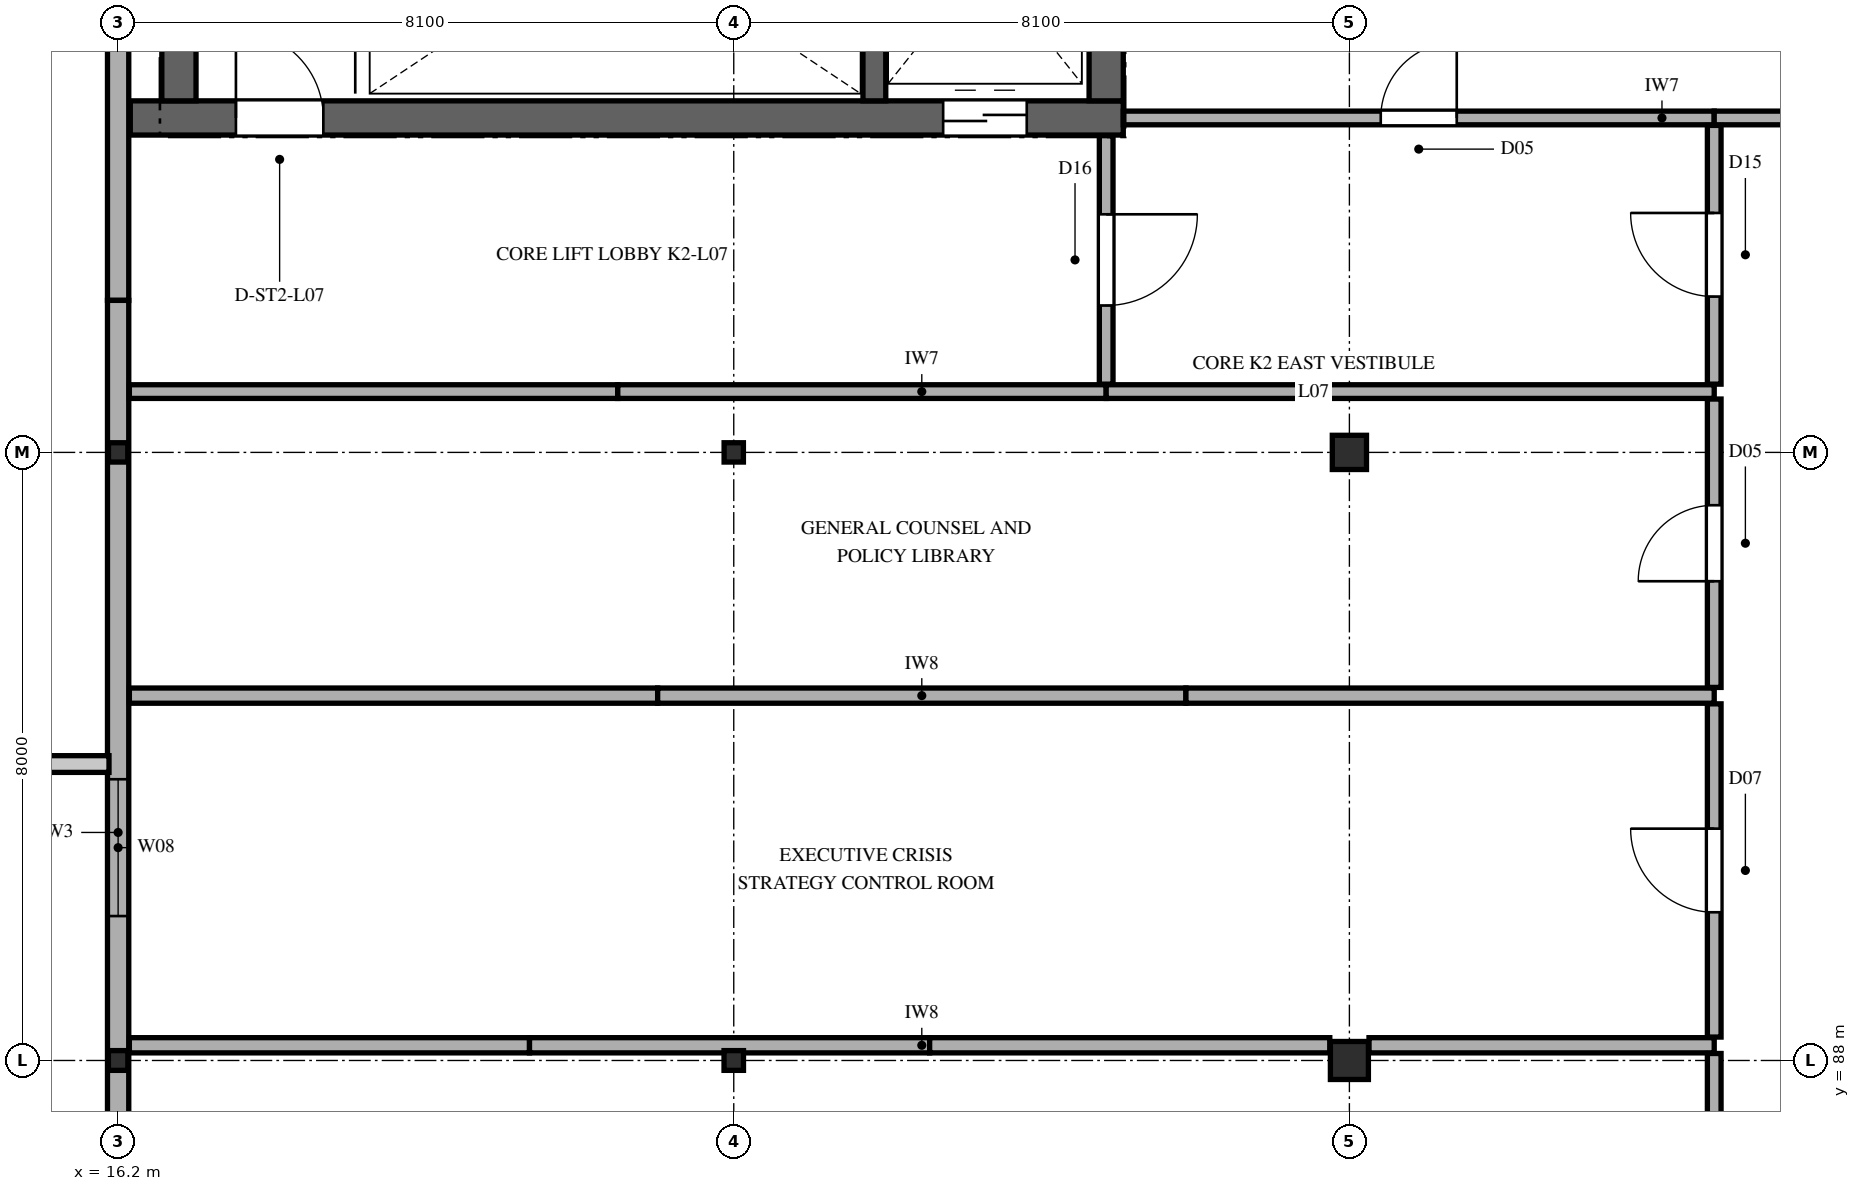
"""IFC4 building model, lengths in metres.
Left out: names, types, materials, properties, quantities, classifications, styles, units other than length and angle.
Written with IfcOpenShell. Run it as: python <this file> out.ifc"""

import sys

from ifc_helpers import new_model, si_unit, direction, frame, frame_2d, origin, origin_2d, place, context, subcontext, project, spatial, rectangle, hollow_rectangle, i_section, extrude, element, fill, save


model = new_model("IFC4")
c1 = context("Model", 3, precision=1e-05, world=origin(), true_north=direction((0.0, 1.0)))
c2 = subcontext(c1, "Body", "Model", "MODEL_VIEW")
j1 = project(units=[si_unit("LENGTHUNIT", "METRE"), si_unit("PLANEANGLEUNIT", "RADIAN")], contexts=[c1])
p1 = place(None, origin())
s1 = spatial("IfcSite", under=j1, at=p1, CompositionType="ELEMENT")
p2 = place(p1, origin())
s2 = spatial("IfcBuilding", under=s1, at=p2, CompositionType="ELEMENT")
p3 = place(p2, frame((0.0, 0.0, 33.3)))
s3 = spatial("IfcBuildingStorey", under=s2, at=p3, CompositionType="ELEMENT", Elevation=33.3)
p4 = place(p3, frame((16.36, 100.4, 0.0), z_axis=(0.0, 0.0, 1.0), x_axis=(1.0, 0.0, 0.0)))
e1 = element("IfcWall", 1, at=p4, inside=s3, PredefinedType="SHEAR", context=c2, shape_type="SweptSolid", body=[
    extrude(rectangle(XDim=13.065, YDim=0.45, at=frame_2d((6.532, 0.0))), origin(), (0.0, 0.0, 1.0), 3.98),
])
p5 = place(p4, frame((1.39, 0.0, 0.0)))
e2 = element("IfcOpeningElement", 2, at=p5, cuts=e1, PredefinedType="OPENING", context=c2, shape_type="SweptSolid", body=[
    extrude(rectangle(XDim=1.15, YDim=2.25, at=frame_2d((0.575, 1.125))), frame((0.0, 0.235, 0.0), z_axis=(0.0, -1.0, 0.0), x_axis=(1.0, 0.0, 0.0)), (0.0, 0.0, 1.0), 0.47),
])
p6 = place(p4, frame((10.695, 0.0, 0.0)))
e3 = element("IfcOpeningElement", 3, at=p6, cuts=e1, PredefinedType="OPENING", context=c2, shape_type="SweptSolid", body=[
    extrude(rectangle(XDim=1.1, YDim=2.2, at=frame_2d((0.55, 1.1))), frame((0.0, 0.235, 0.0), z_axis=(0.0, -1.0, 0.0), x_axis=(1.0, 0.0, 0.0)), (0.0, 0.0, 1.0), 0.47),
])
for number, where, z_axis, x_axis in (
    (4, (17.0, 100.625, 0.0), (0.0, 0.0, 1.0), (0.0, 1.0, 0.0)),
    (5, (29.2, 100.625, 0.0), (0.0, 0.0, 1.0), (0.0, 1.0, 0.0)),
):
    element("IfcWall", number, at=place(p3, frame(where, z_axis=z_axis, x_axis=x_axis)), inside=s3, PredefinedType="SHEAR", context=c2, shape_type="SweptSolid", body=[
        extrude(rectangle(XDim=7.95, YDim=0.45, at=frame_2d((3.975, 0.0))), origin(), (0.0, 0.0, 1.0), 3.98),
    ])
p7 = place(p3, frame((26.15, 100.625, 0.0), z_axis=(0.0, 0.0, 1.0), x_axis=(0.0, 1.0, 0.0)))
e6 = element("IfcWall", 6, at=p7, inside=s3, PredefinedType="SHEAR", context=c2, shape_type="SweptSolid", body=[
    extrude(rectangle(XDim=7.95, YDim=0.3, at=frame_2d((3.975, 0.0))), origin(), (0.0, 0.0, 1.0), 3.98),
])
p8 = place(p3, frame((16.2, 88.0, 0.0), z_axis=(0.0, 0.0, 1.0), x_axis=(1.0, 0.0, 0.0)))
e7 = element("IfcColumn", 7, at=p8, inside=s3, PredefinedType="COLUMN", context=c2, shape_type="SweptSolid", body=[
    extrude(i_section(OverallWidth=0.256, OverallDepth=0.26, WebThickness=0.011, FlangeThickness=0.017, FilletRadius=0.013, at=origin_2d()), origin(), (0.0, 0.0, 1.0), 3.98),
])
p9 = place(p3, frame((16.2, 96.0, 0.0), z_axis=(0.0, 0.0, 1.0), x_axis=(1.0, 0.0, 0.0)))
e8 = element("IfcColumn", 8, at=p9, inside=s3, PredefinedType="COLUMN", context=c2, shape_type="SweptSolid", body=[
    extrude(hollow_rectangle(XDim=0.254, YDim=0.254, WallThickness=0.013, InnerFilletRadius=0.013, OuterFilletRadius=0.025, at=origin_2d()), origin(), (0.0, 0.0, 1.0), 3.98),
])
p10 = place(p3, frame((24.3, 88.0, 0.0), z_axis=(0.0, 0.0, 1.0), x_axis=(1.0, 0.0, 0.0)))
e9 = element("IfcColumn", 9, at=p10, inside=s3, PredefinedType="COLUMN", context=c2, shape_type="SweptSolid", body=[
    extrude(i_section(OverallWidth=0.256, OverallDepth=0.26, WebThickness=0.011, FlangeThickness=0.017, FilletRadius=0.013, at=origin_2d()), origin(), (0.0, 0.0, 1.0), 3.98),
])
p11 = place(p3, frame((24.3, 96.0, 0.0), z_axis=(0.0, 0.0, 1.0), x_axis=(1.0, 0.0, 0.0)))
e10 = element("IfcColumn", 10, at=p11, inside=s3, PredefinedType="COLUMN", context=c2, shape_type="SweptSolid", body=[
    extrude(hollow_rectangle(XDim=0.254, YDim=0.254, WallThickness=0.013, InnerFilletRadius=0.013, OuterFilletRadius=0.025, at=origin_2d()), origin(), (0.0, 0.0, 1.0), 3.98),
])
p12 = place(p3, frame((32.4, 88.0, 0.0), z_axis=(0.0, 0.0, 1.0), x_axis=(1.0, 0.0, 0.0)))
e11 = element("IfcColumn", 11, at=p12, inside=s3, PredefinedType="COLUMN", context=c2, shape_type="SweptSolid", body=[
    extrude(rectangle(XDim=0.5, YDim=0.5, at=origin_2d()), origin(), (0.0, 0.0, 1.0), 3.98),
])
p13 = place(p3, frame((32.4, 96.0, 0.0), z_axis=(0.0, 0.0, 1.0), x_axis=(1.0, 0.0, 0.0)))
e12 = element("IfcColumn", 12, at=p13, inside=s3, PredefinedType="COLUMN", context=c2, shape_type="SweptSolid", body=[
    extrude(rectangle(XDim=0.45, YDim=0.45, at=origin_2d()), origin(), (0.0, 0.0, 1.0), 3.98),
])
p14 = place(p3, frame((16.2, 112.0, 0.0), z_axis=(0.0, 0.0, 1.0), x_axis=(0.0, -1.0, 0.0)))
e13 = element("IfcWall", 13, at=p14, inside=s3, PredefinedType="SOLIDWALL", context=c2, shape_type="SweptSolid", body=[
    extrude(rectangle(XDim=14.0, YDim=0.28, at=frame_2d((7.0, 0.0))), origin(), (0.0, 0.0, 1.0), 3.655),
])
p15 = place(p3, frame((16.2, 98.0, 0.0), z_axis=(0.0, 0.0, 1.0), x_axis=(0.0, -1.0, 0.0)))
e14 = element("IfcWall", 14, at=p15, inside=s3, PredefinedType="SOLIDWALL", context=c2, shape_type="SweptSolid", body=[
    extrude(rectangle(XDim=14.0, YDim=0.28, at=frame_2d((7.0, 0.0))), origin(), (0.0, 0.0, 1.0), 3.655),
])
p16 = place(p15, frame((6.3, 0.0, 0.95)))
e15 = element("IfcOpeningElement", 15, at=p16, cuts=e14, PredefinedType="OPENING", context=c2, shape_type="SweptSolid", body=[
    extrude(rectangle(XDim=1.8, YDim=1.5, at=frame_2d((0.9, 0.75))), frame((0.0, 0.15, 0.0), z_axis=(0.0, -1.0, 0.0), x_axis=(1.0, 0.0, 0.0)), (0.0, 0.0, 1.0), 0.3),
])
p17 = place(p3, frame((16.348, 88.2, 0.0), z_axis=(0.0, 0.0, 1.0), x_axis=(1.0, 0.0, 0.0)))
e16 = element("IfcWall", 16, at=p17, inside=s3, PredefinedType="PARTITIONING", context=c2, shape_type="SweptSolid", body=[
    extrude(rectangle(XDim=5.265, YDim=0.2, at=frame_2d((2.632, 0.0))), origin(), (0.0, 0.0, 1.0), 3.655),
])
p18 = place(p3, frame((21.613, 88.2, 0.0), z_axis=(0.0, 0.0, 1.0), x_axis=(1.0, 0.0, 0.0)))
e17 = element("IfcWall", 17, at=p18, inside=s3, PredefinedType="PARTITIONING", context=c2, shape_type="SweptSolid", body=[
    extrude(rectangle(XDim=5.265, YDim=0.2, at=frame_2d((2.632, 0.0))), origin(), (0.0, 0.0, 1.0), 3.655),
])
p19 = place(p3, frame((26.877, 88.2, 0.0), z_axis=(0.0, 0.0, 1.0), x_axis=(1.0, 0.0, 0.0)))
e18 = element("IfcWall", 18, at=p19, inside=s3, PredefinedType="PARTITIONING", context=c2, shape_type="SweptSolid", body=[
    extrude(rectangle(XDim=5.265, YDim=0.2, at=frame_2d((2.632, 0.0))), origin(), (0.0, 0.0, 1.0), 3.655),
])
p20 = place(p3, frame((32.658, 88.2, 0.0), z_axis=(0.0, 0.0, 1.0), x_axis=(1.0, 0.0, 0.0)))
e19 = element("IfcWall", 19, at=p20, inside=s3, PredefinedType="PARTITIONING", context=c2, shape_type="SweptSolid", body=[
    extrude(rectangle(XDim=4.542, YDim=0.2, at=frame_2d((2.271, 0.0))), origin(), (0.0, 0.0, 1.0), 3.655),
])
for number, where, z_axis, x_axis in (
    (20, (16.348, 92.8, 0.0), (0.0, 0.0, 1.0), (1.0, 0.0, 0.0)),
    (21, (23.299, 92.8, 0.0), (0.0, 0.0, 1.0), (1.0, 0.0, 0.0)),
    (22, (30.249, 92.8, 0.0), (0.0, 0.0, 1.0), (1.0, 0.0, 0.0)),
):
    element("IfcWall", number, at=place(p3, frame(where, z_axis=z_axis, x_axis=x_axis)), inside=s3, PredefinedType="PARTITIONING", context=c2, shape_type="SweptSolid", body=[
        extrude(rectangle(XDim=6.951, YDim=0.2, at=frame_2d((3.475, 0.0))), origin(), (0.0, 0.0, 1.0), 3.98),
    ])
for number, where, z_axis, x_axis in (
    (23, (16.348, 96.8, 0.0), (0.0, 0.0, 1.0), (1.0, 0.0, 0.0)),
    (24, (22.774, 96.8, 0.0), (0.0, 0.0, 1.0), (1.0, 0.0, 0.0)),
):
    element("IfcWall", number, at=place(p3, frame(where, z_axis=z_axis, x_axis=x_axis)), inside=s3, PredefinedType="PARTITIONING", context=c2, shape_type="SweptSolid", body=[
        extrude(rectangle(XDim=6.426, YDim=0.18, at=frame_2d((3.213, 0.0))), origin(), (0.0, 0.0, 1.0), 3.98),
    ])
p21 = place(p3, frame((29.2, 96.8, 0.0), z_axis=(0.0, 0.0, 1.0), x_axis=(1.0, 0.0, 0.0)))
e25 = element("IfcWall", 25, at=p21, inside=s3, PredefinedType="PARTITIONING", context=c2, shape_type="SweptSolid", body=[
    extrude(rectangle(XDim=8.0, YDim=0.18, at=frame_2d((4.0, 0.0))), origin(), (0.0, 0.0, 1.0), 3.98),
])
p22 = place(p3, frame((29.425, 100.4, 0.0), z_axis=(0.0, 0.0, 1.0), x_axis=(1.0, 0.0, 0.0)))
e26 = element("IfcWall", 26, at=p22, inside=s3, PredefinedType="PARTITIONING", context=c2, shape_type="SweptSolid", body=[
    extrude(rectangle(XDim=7.775, YDim=0.18, at=frame_2d((3.887, 0.0))), origin(), (0.0, 0.0, 1.0), 3.98),
])
p23 = place(p22, frame((3.387, 0.0, 0.0)))
e27 = element("IfcOpeningElement", 27, at=p23, cuts=e26, PredefinedType="OPENING", context=c2, shape_type="SweptSolid", body=[
    extrude(rectangle(XDim=1.0, YDim=2.2, at=frame_2d((0.5, 1.1))), frame((0.0, 0.1, 0.0), z_axis=(0.0, -1.0, 0.0), x_axis=(1.0, 0.0, 0.0)), (0.0, 0.0, 1.0), 0.2),
])
p24 = place(p3, frame((37.2, 100.4, 0.0), z_axis=(0.0, 0.0, 1.0), x_axis=(1.0, 0.0, 0.0)))
e28 = element("IfcWall", 28, at=p24, inside=s3, PredefinedType="PARTITIONING", context=c2, shape_type="SweptSolid", body=[
    extrude(rectangle(XDim=2.4, YDim=0.18, at=frame_2d((1.2, 0.0))), origin(), (0.0, 0.0, 1.0), 3.98),
])
p25 = place(p3, frame((29.2, 96.898, 0.0), z_axis=(0.0, 0.0, 1.0), x_axis=(0.0, 1.0, 0.0)))
e29 = element("IfcWall", 29, at=p25, inside=s3, PredefinedType="PARTITIONING", context=c2, shape_type="SweptSolid", body=[
    extrude(rectangle(XDim=3.269, YDim=0.18, at=frame_2d((1.635, 0.0))), origin(), (0.0, 0.0, 1.0), 3.98),
])
p26 = place(p25, frame((1.034, 0.0, 0.0)))
e30 = element("IfcOpeningElement", 30, at=p26, cuts=e29, PredefinedType="OPENING", context=c2, shape_type="SweptSolid", body=[
    extrude(rectangle(XDim=1.2, YDim=2.2, at=frame_2d((0.6, 1.1))), frame((0.0, 0.1, 0.0), z_axis=(0.0, -1.0, 0.0), x_axis=(1.0, 0.0, 0.0)), (0.0, 0.0, 1.0), 0.2),
])
p27 = place(p3, frame((37.2, 82.063, 0.0), z_axis=(0.0, 0.0, 1.0), x_axis=(0.0, 1.0, 0.0)))
e31 = element("IfcWall", 31, at=p27, inside=s3, PredefinedType="PARTITIONING", context=c2, shape_type="SweptSolid", body=[
    extrude(rectangle(XDim=6.029, YDim=0.18, at=frame_2d((3.015, 0.0))), origin(), (0.0, 0.0, 1.0), 3.98),
])
p28 = place(p27, frame((2.514, 0.0, 0.0)))
e32 = element("IfcOpeningElement", 32, at=p28, cuts=e31, PredefinedType="OPENING", context=c2, shape_type="SweptSolid", body=[
    extrude(rectangle(XDim=1.0, YDim=2.2, at=frame_2d((0.5, 1.1))), frame((0.0, 0.1, 0.0), z_axis=(0.0, -1.0, 0.0), x_axis=(1.0, 0.0, 0.0)), (0.0, 0.0, 1.0), 0.2),
])
p29 = place(p3, frame((37.2, 88.308, 0.0), z_axis=(0.0, 0.0, 1.0), x_axis=(0.0, 1.0, 0.0)))
e33 = element("IfcWall", 33, at=p29, inside=s3, PredefinedType="PARTITIONING", context=c2, shape_type="SweptSolid", body=[
    extrude(rectangle(XDim=4.384, YDim=0.18, at=frame_2d((2.192, 0.0))), origin(), (0.0, 0.0, 1.0), 3.98),
])
p30 = place(p29, frame((1.642, 0.0, 0.0)))
e34 = element("IfcOpeningElement", 34, at=p30, cuts=e33, PredefinedType="OPENING", context=c2, shape_type="SweptSolid", body=[
    extrude(rectangle(XDim=1.1, YDim=2.2, at=frame_2d((0.55, 1.1))), frame((0.0, 0.1, 0.0), z_axis=(0.0, -1.0, 0.0), x_axis=(1.0, 0.0, 0.0)), (0.0, 0.0, 1.0), 0.2),
])
p31 = place(p3, frame((37.2, 92.908, 0.0), z_axis=(0.0, 0.0, 1.0), x_axis=(0.0, 1.0, 0.0)))
e35 = element("IfcWall", 35, at=p31, inside=s3, PredefinedType="PARTITIONING", context=c2, shape_type="SweptSolid", body=[
    extrude(rectangle(XDim=3.794, YDim=0.18, at=frame_2d((1.897, 0.0))), origin(), (0.0, 0.0, 1.0), 3.98),
])
p32 = place(p31, frame((1.397, 0.0, 0.0)))
e36 = element("IfcOpeningElement", 36, at=p32, cuts=e35, PredefinedType="OPENING", context=c2, shape_type="SweptSolid", body=[
    extrude(rectangle(XDim=1.0, YDim=2.2, at=frame_2d((0.5, 1.1))), frame((0.0, 0.1, 0.0), z_axis=(0.0, -1.0, 0.0), x_axis=(1.0, 0.0, 0.0)), (0.0, 0.0, 1.0), 0.2),
])
p33 = place(p3, frame((37.2, 96.898, 0.0), z_axis=(0.0, 0.0, 1.0), x_axis=(0.0, 1.0, 0.0)))
e37 = element("IfcWall", 37, at=p33, inside=s3, PredefinedType="PARTITIONING", context=c2, shape_type="SweptSolid", body=[
    extrude(rectangle(XDim=3.404, YDim=0.18, at=frame_2d((1.702, 0.0))), origin(), (0.0, 0.0, 1.0), 3.98),
])
p34 = place(p33, frame((1.152, 0.0, 0.0)))
e38 = element("IfcOpeningElement", 38, at=p34, cuts=e37, PredefinedType="OPENING", context=c2, shape_type="SweptSolid", body=[
    extrude(rectangle(XDim=1.1, YDim=2.2, at=frame_2d((0.55, 1.1))), frame((0.0, 0.1, 0.0), z_axis=(0.0, -1.0, 0.0), x_axis=(1.0, 0.0, 0.0)), (0.0, 0.0, 1.0), 0.2),
])
p35 = place(p16, origin())
e39 = element("IfcWindow", 39, at=p35, inside=s3, PartitioningType="DOUBLE_PANEL_VERTICAL", PredefinedType="WINDOW", context=c2, shape_type="SweptSolid", body=[
    extrude(rectangle(XDim=1.8, YDim=1.5, at=frame_2d((0.9, 0.75))), frame((0.0, 0.03, 0.0), z_axis=(0.0, -1.0, 0.0), x_axis=(1.0, 0.0, 0.0)), (0.0, 0.0, 1.0), 0.06),
])
fill(e15, e39)
p36 = place(p5, origin())
e40 = element("IfcDoor", 40, at=p36, inside=s3, OperationType="SINGLE_SWING_LEFT", PredefinedType="DOOR", context=c2, shape_type="SweptSolid", body=[
    extrude(rectangle(XDim=1.15, YDim=2.25, at=frame_2d((0.575, 1.125))), frame((0.0, 0.025, 0.0), z_axis=(0.0, -1.0, 0.0), x_axis=(1.0, 0.0, 0.0)), (0.0, 0.0, 1.0), 0.05),
])
fill(e2, e40)
p37 = place(p6, frame((1.1, 0.0, 0.0), z_axis=(0.0, 0.0, 1.0), x_axis=(-1.0, 0.0, 0.0)))
e41 = element("IfcDoor", 41, at=p37, inside=s3, OperationType="DOUBLE_DOOR_SLIDING", PredefinedType="DOOR", context=c2, shape_type="SweptSolid", body=[
    extrude(rectangle(XDim=1.1, YDim=2.2, at=frame_2d((0.55, 1.1))), frame((0.0, 0.025, 0.0), z_axis=(0.0, -1.0, 0.0), x_axis=(1.0, 0.0, 0.0)), (0.0, 0.0, 1.0), 0.05),
])
fill(e3, e41)
p38 = place(p23, origin())
e42 = element("IfcDoor", 42, at=p38, inside=s3, OperationType="SINGLE_SWING_RIGHT", PredefinedType="DOOR", context=c2, shape_type="SweptSolid", body=[
    extrude(rectangle(XDim=1.0, YDim=2.2, at=frame_2d((0.5, 1.1))), frame((0.0, 0.025, 0.0), z_axis=(0.0, -1.0, 0.0), x_axis=(1.0, 0.0, 0.0)), (0.0, 0.0, 1.0), 0.05),
])
fill(e27, e42)
p39 = place(p26, frame((1.2, 0.0, 0.0), z_axis=(0.0, 0.0, 1.0), x_axis=(-1.0, 0.0, 0.0)))
e43 = element("IfcDoor", 43, at=p39, inside=s3, OperationType="SINGLE_SWING_RIGHT", PredefinedType="DOOR", context=c2, shape_type="SweptSolid", body=[
    extrude(rectangle(XDim=1.2, YDim=2.2, at=frame_2d((0.6, 1.1))), frame((0.0, 0.025, 0.0), z_axis=(0.0, -1.0, 0.0), x_axis=(1.0, 0.0, 0.0)), (0.0, 0.0, 1.0), 0.05),
])
fill(e30, e43)
p40 = place(p30, origin())
e44 = element("IfcDoor", 44, at=p40, inside=s3, OperationType="SINGLE_SWING_RIGHT", PredefinedType="DOOR", context=c2, shape_type="SweptSolid", body=[
    extrude(rectangle(XDim=1.1, YDim=2.2, at=frame_2d((0.55, 1.1))), frame((0.0, 0.025, 0.0), z_axis=(0.0, -1.0, 0.0), x_axis=(1.0, 0.0, 0.0)), (0.0, 0.0, 1.0), 0.05),
])
fill(e34, e44)
p41 = place(p32, origin())
e45 = element("IfcDoor", 45, at=p41, inside=s3, OperationType="SINGLE_SWING_LEFT", PredefinedType="DOOR", context=c2, shape_type="SweptSolid", body=[
    extrude(rectangle(XDim=1.0, YDim=2.2, at=frame_2d((0.5, 1.1))), frame((0.0, 0.025, 0.0), z_axis=(0.0, -1.0, 0.0), x_axis=(1.0, 0.0, 0.0)), (0.0, 0.0, 1.0), 0.05),
])
fill(e36, e45)
p42 = place(p34, origin())
e46 = element("IfcDoor", 46, at=p42, inside=s3, OperationType="SINGLE_SWING_RIGHT", PredefinedType="DOOR", context=c2, shape_type="SweptSolid", body=[
    extrude(rectangle(XDim=1.1, YDim=2.2, at=frame_2d((0.55, 1.1))), frame((0.0, 0.025, 0.0), z_axis=(0.0, -1.0, 0.0), x_axis=(1.0, 0.0, 0.0)), (0.0, 0.0, 1.0), 0.05),
])
fill(e38, e46)
save(model, sys.argv[1])
